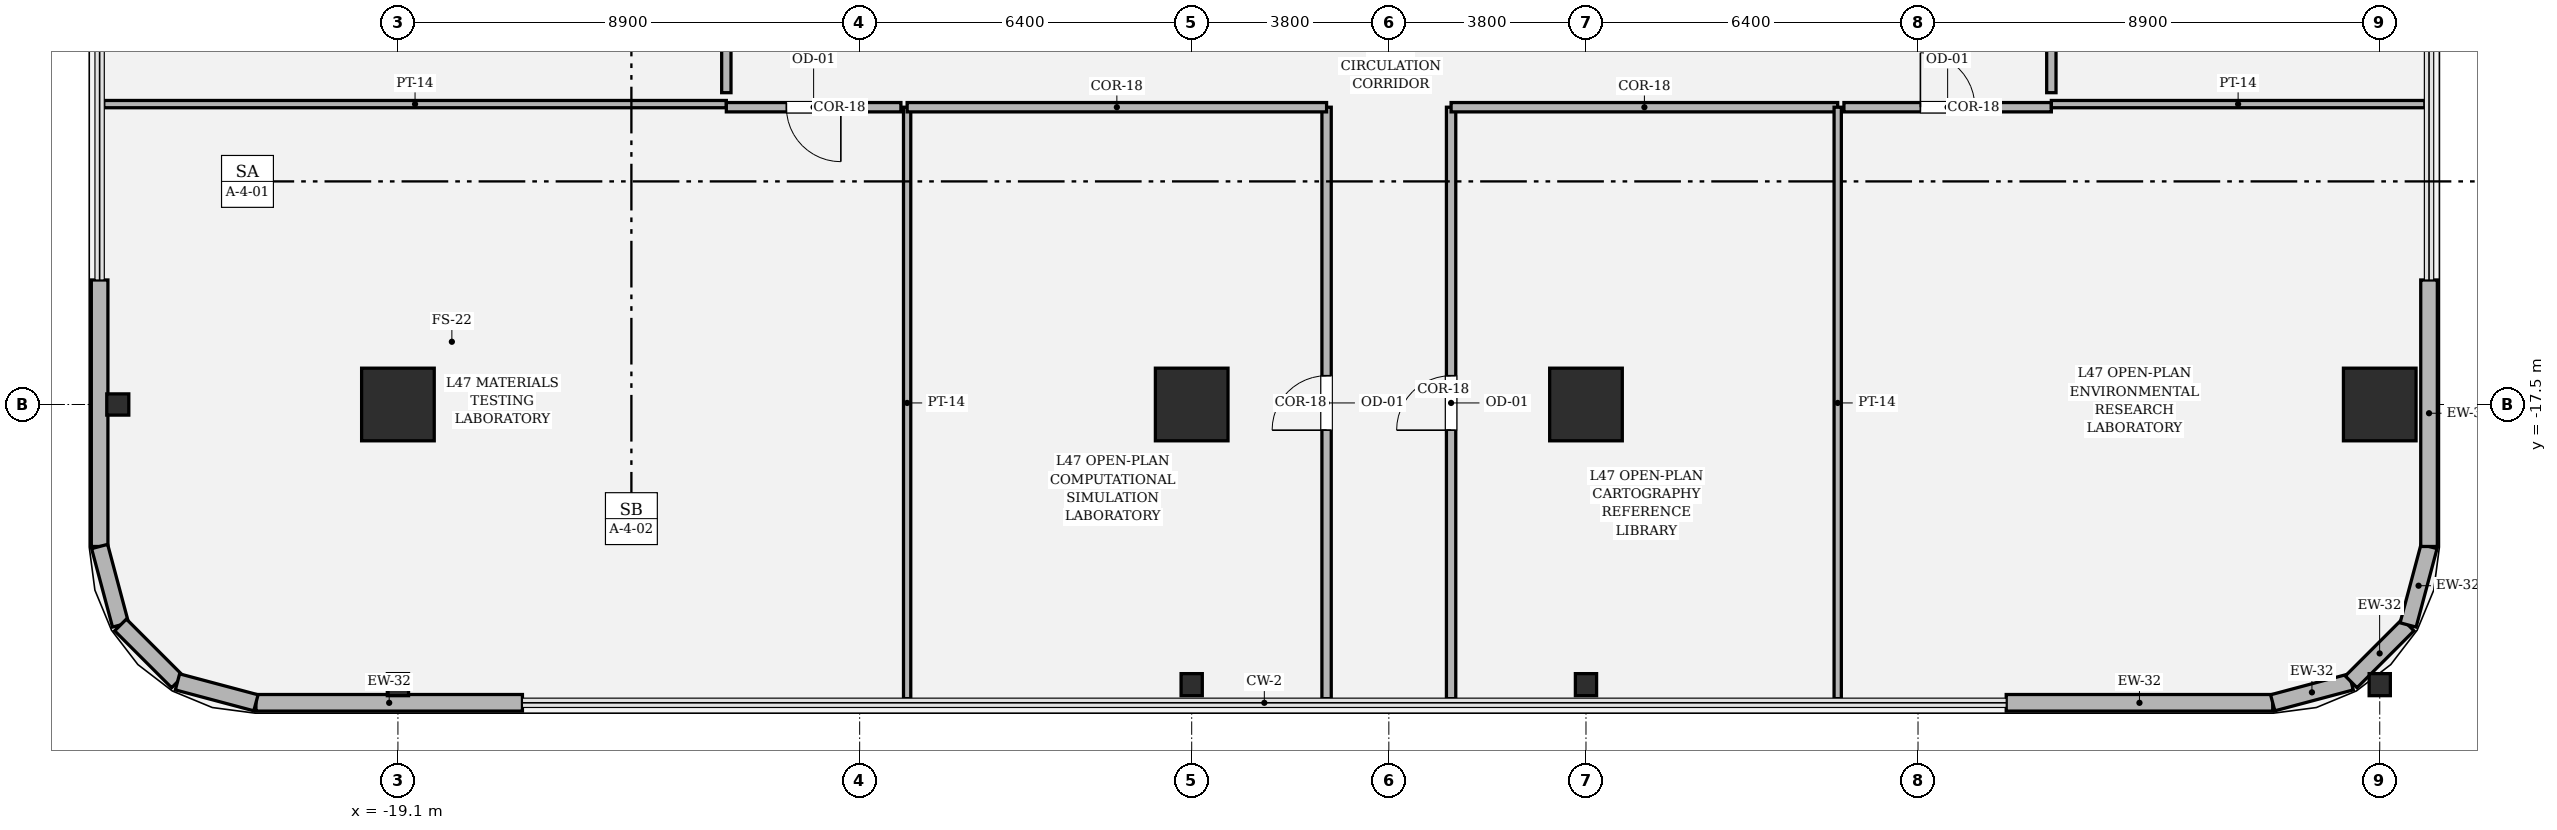
"""IFC4 building model, lengths in metres.
Left out: names, types, materials, properties, quantities, classifications, styles, units other than length and angle.
Written with IfcOpenShell. Run it as: python <this file> out.ifc"""

import sys

from ifc_helpers import new_model, si_unit, direction, frame, frame_2d, origin, origin_2d, place, context, subcontext, project, spatial, rectangle, hollow_rectangle, i_section, extrude, element, fill, save


model = new_model("IFC4")
c1 = context("Model", 3, precision=1e-05, world=origin(), true_north=direction((0.0, 1.0)))
c2 = subcontext(c1, "Body", "Model", "MODEL_VIEW")
j1 = project(units=[si_unit("LENGTHUNIT", "METRE"), si_unit("PLANEANGLEUNIT", "RADIAN")], contexts=[c1])
p1 = place(None, origin())
s1 = spatial("IfcSite", under=j1, at=p1, CompositionType="ELEMENT")
p2 = place(p1, origin())
s2 = spatial("IfcBuilding", under=s1, at=p2, CompositionType="ELEMENT")
p3 = place(p2, frame((0.0, 0.0, 200.55)))
s3 = spatial("IfcBuildingStorey", under=s2, at=p3, CompositionType="ELEMENT", Elevation=200.55)
for number, where, z_axis, x_axis in (
    (1, (-19.1, -17.5, 0.0), (0.0, 0.0, 1.0), (1.0, 0.0, 0.0)),
    (2, (-3.8, -17.5, 0.0), (0.0, 0.0, 1.0), (1.0, 0.0, 0.0)),
    (3, (3.8, -17.5, 0.0), (0.0, 0.0, 1.0), (1.0, 0.0, 0.0)),
    (4, (19.1, -17.5, 0.0), (0.0, 0.0, 1.0), (1.0, 0.0, 0.0)),
):
    element("IfcColumn", number, at=place(p3, frame(where, z_axis=z_axis, x_axis=x_axis)), inside=s3, PredefinedType="COLUMN", context=c2, shape_type="SweptSolid", body=[
        extrude(hollow_rectangle(XDim=1.4, YDim=1.4, WallThickness=0.042, at=origin_2d()), origin(), (0.0, 0.0, 1.0), 4.05),
    ])
for number, where, z_axis, x_axis in (
    (5, (-19.1, -22.9, 0.0), (0.0, 0.0, 1.0), (1.0, 0.0, 0.0)),
    (6, (-3.8, -22.9, 0.0), (0.0, 0.0, 1.0), (1.0, 0.0, 0.0)),
    (7, (3.8, -22.9, 0.0), (0.0, 0.0, 1.0), (1.0, 0.0, 0.0)),
    (8, (19.1, -22.9, 0.0), (0.0, 0.0, 1.0), (1.0, 0.0, 0.0)),
    (9, (-24.5, -17.5, 0.0), (0.0, 0.0, 1.0), (0.0, 1.0, 0.0)),
):
    element("IfcColumn", number, at=place(p3, frame(where, z_axis=z_axis, x_axis=x_axis)), inside=s3, PredefinedType="COLUMN", context=c2, shape_type="SweptSolid", body=[
        extrude(i_section(OverallWidth=0.409, OverallDepth=0.425, WebThickness=0.032, FlangeThickness=0.052, FilletRadius=0.018, at=origin_2d()), origin(), (0.0, 0.0, 1.0), 4.048),
    ])
for number, where, z_axis, x_axis in (
    (10, (-21.837, -23.25, 0.0), (0.0, 0.0, 1.0), (1.0, 0.0, 0.0)),
    (11, (11.9, -23.25, 0.0), (0.0, 0.0, 1.0), (1.0, 0.0, 0.0)),
):
    element("IfcWall", number, at=place(p3, frame(where, z_axis=z_axis, x_axis=x_axis)), inside=s3, PredefinedType="SOLIDWALL", context=c2, shape_type="SweptSolid", body=[
        extrude(rectangle(XDim=5.137, YDim=0.32, at=frame_2d((2.568, 0.0))), origin(), (0.0, 0.0, 1.0), 2.444),
    ])
p4 = place(p3, frame((17.037, -23.25, 0.0), z_axis=(0.0, 0.0, 1.0), x_axis=(0.966224582397, 0.257701486942, 0.0)))
e12 = element("IfcWall", 12, at=p4, inside=s3, PredefinedType="SOLIDWALL", context=c2, shape_type="SweptSolid", body=[
    extrude(rectangle(XDim=1.565, YDim=0.32, at=frame_2d((0.783, 0.0))), origin(), (0.0, 0.0, 1.0), 2.444),
])
p5 = place(p3, frame((18.549, -22.847, 0.0), z_axis=(0.0, 0.0, 1.0), x_axis=(0.707028130747, 0.707185422879, 0.0)))
e13 = element("IfcWall", 13, at=p5, inside=s3, PredefinedType="SOLIDWALL", context=c2, shape_type="SweptSolid", body=[
    extrude(rectangle(XDim=1.552, YDim=0.32, at=frame_2d((0.776, 0.0))), origin(), (0.0, 0.0, 1.0), 2.444),
])
p6 = place(p3, frame((19.646, -21.749, 0.0), z_axis=(0.0, 0.0, 1.0), x_axis=(0.257847112249, 0.966185730957, 0.0)))
e14 = element("IfcWall", 14, at=p6, inside=s3, PredefinedType="SOLIDWALL", context=c2, shape_type="SweptSolid", body=[
    extrude(rectangle(XDim=1.565, YDim=0.32, at=frame_2d((0.783, 0.0))), origin(), (0.0, 0.0, 1.0), 3.77),
])
p7 = place(p3, frame((20.05, -20.237, 0.0), z_axis=(0.0, 0.0, 1.0), x_axis=(0.0, 1.0, 0.0)))
e15 = element("IfcWall", 15, at=p7, inside=s3, PredefinedType="SOLIDWALL", context=c2, shape_type="SweptSolid", body=[
    extrude(rectangle(XDim=5.137, YDim=0.32, at=frame_2d((2.568, 0.0))), origin(), (0.0, 0.0, 1.0), 2.444),
])
p8 = place(p3, frame((-24.85, -15.1, 0.0), z_axis=(0.0, 0.0, 1.0), x_axis=(0.0, -1.0, 0.0)))
e16 = element("IfcWall", 16, at=p8, inside=s3, PredefinedType="SOLIDWALL", context=c2, shape_type="SweptSolid", body=[
    extrude(rectangle(XDim=5.137, YDim=0.32, at=frame_2d((2.568, 0.0))), origin(), (0.0, 0.0, 1.0), 3.77),
])
p9 = place(p3, frame((-24.85, -20.237, 0.0), z_axis=(0.0, 0.0, 1.0), x_axis=(0.257847112249, -0.966185730957, 0.0)))
e17 = element("IfcWall", 17, at=p9, inside=s3, PredefinedType="SOLIDWALL", context=c2, shape_type="SweptSolid", body=[
    extrude(rectangle(XDim=1.565, YDim=0.32, at=frame_2d((0.783, 0.0))), origin(), (0.0, 0.0, 1.0), 3.77),
])
p10 = place(p3, frame((-24.447, -21.749, 0.0), z_axis=(0.0, 0.0, 1.0), x_axis=(0.707028130747, -0.707185422879, 0.0)))
e18 = element("IfcWall", 18, at=p10, inside=s3, PredefinedType="SOLIDWALL", context=c2, shape_type="SweptSolid", body=[
    extrude(rectangle(XDim=1.552, YDim=0.32, at=frame_2d((0.776, 0.0))), origin(), (0.0, 0.0, 1.0), 3.77),
])
p11 = place(p3, frame((-23.349, -22.847, 0.0), z_axis=(0.0, 0.0, 1.0), x_axis=(0.966224582397, -0.257701486942, 0.0)))
e19 = element("IfcWall", 19, at=p11, inside=s3, PredefinedType="SOLIDWALL", context=c2, shape_type="SweptSolid", body=[
    extrude(rectangle(XDim=1.565, YDim=0.32, at=frame_2d((0.783, 0.0))), origin(), (0.0, 0.0, 1.0), 3.77),
])
p12 = place(p3, frame((-1.2, -11.77, 0.0), z_axis=(0.0, 0.0, 1.0), x_axis=(0.0, -1.0, 0.0)))
e20 = element("IfcWall", 20, at=p12, inside=s3, PredefinedType="PARTITIONING", context=c2, shape_type="SweptSolid", body=[
    extrude(rectangle(XDim=11.4, YDim=0.18, at=frame_2d((5.7, 0.0))), origin(), (0.0, 0.0, 1.0), 2.444),
])
p13 = place(p12, frame((5.175, 0.0, 0.0)))
e21 = element("IfcOpeningElement", 21, at=p13, cuts=e20, PredefinedType="OPENING", context=c2, shape_type="SweptSolid", body=[
    extrude(rectangle(XDim=1.05, YDim=2.2, at=frame_2d((0.525, 1.1))), frame((0.0, 0.1, 0.0), z_axis=(0.0, -1.0, 0.0), x_axis=(1.0, 0.0, 0.0)), (0.0, 0.0, 1.0), 0.2),
])
p14 = place(p3, frame((-9.285, -23.17, 0.0), z_axis=(0.0, 0.0, 1.0), x_axis=(0.0, 1.0, 0.0)))
e22 = element("IfcWall", 22, at=p14, inside=s3, PredefinedType="PARTITIONING", context=c2, shape_type="SweptSolid", body=[
    extrude(rectangle(XDim=11.4, YDim=0.14, at=frame_2d((5.7, 0.0))), origin(), (0.0, 0.0, 1.0), 2.444),
])
p15 = place(p3, frame((-9.285, -11.77, 0.0), z_axis=(0.0, 0.0, 1.0), x_axis=(1.0, 0.0, 0.0)))
e23 = element("IfcWall", 23, at=p15, inside=s3, PredefinedType="PARTITIONING", context=c2, shape_type="SweptSolid", body=[
    extrude(rectangle(XDim=8.085, YDim=0.18, at=frame_2d((4.042, 0.0))), origin(), (0.0, 0.0, 1.0), 2.444),
])
p16 = place(p3, frame((1.2, -23.17, 0.0), z_axis=(0.0, 0.0, 1.0), x_axis=(0.0, 1.0, 0.0)))
e24 = element("IfcWall", 24, at=p16, inside=s3, PredefinedType="PARTITIONING", context=c2, shape_type="SweptSolid", body=[
    extrude(rectangle(XDim=11.4, YDim=0.18, at=frame_2d((5.7, 0.0))), origin(), (0.0, 0.0, 1.0), 2.444),
])
p17 = place(p16, frame((5.175, 0.0, 0.0)))
e25 = element("IfcOpeningElement", 25, at=p17, cuts=e24, PredefinedType="OPENING", context=c2, shape_type="SweptSolid", body=[
    extrude(rectangle(XDim=1.05, YDim=2.2, at=frame_2d((0.525, 1.1))), frame((0.0, 0.1, 0.0), z_axis=(0.0, -1.0, 0.0), x_axis=(1.0, 0.0, 0.0)), (0.0, 0.0, 1.0), 0.2),
])
p18 = place(p3, frame((1.2, -11.77, 0.0), z_axis=(0.0, 0.0, 1.0), x_axis=(1.0, 0.0, 0.0)))
e26 = element("IfcWall", 26, at=p18, inside=s3, PredefinedType="PARTITIONING", context=c2, shape_type="SweptSolid", body=[
    extrude(rectangle(XDim=7.452, YDim=0.18, at=frame_2d((3.726, 0.0))), origin(), (0.0, 0.0, 1.0), 2.444),
])
p19 = place(p3, frame((8.652, -11.77, 0.0), z_axis=(0.0, 0.0, 1.0), x_axis=(0.0, -1.0, 0.0)))
e27 = element("IfcWall", 27, at=p19, inside=s3, PredefinedType="PARTITIONING", context=c2, shape_type="SweptSolid", body=[
    extrude(rectangle(XDim=11.4, YDim=0.14, at=frame_2d((5.7, 0.0))), origin(), (0.0, 0.0, 1.0), 2.444),
])
p20 = place(p3, frame((-24.77, -11.71, 0.0), z_axis=(0.0, 0.0, 1.0), x_axis=(1.0, 0.0, 0.0)))
e28 = element("IfcWall", 28, at=p20, inside=s3, PredefinedType="PARTITIONING", context=c2, shape_type="SweptSolid", body=[
    extrude(rectangle(XDim=12.0, YDim=0.14, at=frame_2d((6.0, 0.0))), origin(), (0.0, 0.0, 1.0), 2.444),
])
p21 = place(p3, frame((-12.77, -11.77, 0.0), z_axis=(0.0, 0.0, 1.0), x_axis=(1.0, 0.0, 0.0)))
e29 = element("IfcWall", 29, at=p21, inside=s3, PredefinedType="PARTITIONING", context=c2, shape_type="SweptSolid", body=[
    extrude(rectangle(XDim=3.365, YDim=0.18, at=frame_2d((1.683, 0.0))), origin(), (0.0, 0.0, 1.0), 2.444),
])
p22 = place(p21, frame((1.157, 0.0, 0.0)))
e30 = element("IfcOpeningElement", 30, at=p22, cuts=e29, PredefinedType="OPENING", context=c2, shape_type="SweptSolid", body=[
    extrude(rectangle(XDim=1.05, YDim=2.2, at=frame_2d((0.525, 1.1))), frame((0.0, 0.1, 0.0), z_axis=(0.0, -1.0, 0.0), x_axis=(1.0, 0.0, 0.0)), (0.0, 0.0, 1.0), 0.2),
])
p23 = place(p3, frame((8.772, -11.77, 0.0), z_axis=(0.0, 0.0, 1.0), x_axis=(1.0, 0.0, 0.0)))
e31 = element("IfcWall", 31, at=p23, inside=s3, PredefinedType="PARTITIONING", context=c2, shape_type="SweptSolid", body=[
    extrude(rectangle(XDim=3.998, YDim=0.18, at=frame_2d((1.999, 0.0))), origin(), (0.0, 0.0, 1.0), 2.444),
])
p24 = place(p23, frame((1.474, 0.0, 0.0)))
e32 = element("IfcOpeningElement", 32, at=p24, cuts=e31, PredefinedType="OPENING", context=c2, shape_type="SweptSolid", body=[
    extrude(rectangle(XDim=1.05, YDim=2.2, at=frame_2d((0.525, 1.1))), frame((0.0, 0.1, 0.0), z_axis=(0.0, -1.0, 0.0), x_axis=(1.0, 0.0, 0.0)), (0.0, 0.0, 1.0), 0.2),
])
p25 = place(p3, frame((12.77, -11.71, 0.0), z_axis=(0.0, 0.0, 1.0), x_axis=(1.0, 0.0, 0.0)))
e33 = element("IfcWall", 33, at=p25, inside=s3, PredefinedType="PARTITIONING", context=c2, shape_type="SweptSolid", body=[
    extrude(rectangle(XDim=7.2, YDim=0.14, at=frame_2d((3.6, 0.0))), origin(), (0.0, 0.0, 1.0), 2.444),
])
p26 = place(p3, frame((-12.77, 3.74, 0.0), z_axis=(0.0, 0.0, 1.0), x_axis=(0.0, -1.0, 0.0)))
e34 = element("IfcWall", 34, at=p26, inside=s3, PredefinedType="PARTITIONING", context=c2, shape_type="SweptSolid", body=[
    extrude(rectangle(XDim=15.23, YDim=0.18, at=frame_2d((7.615, 0.0))), origin(), (0.0, 0.0, 1.0), 2.444),
])
p27 = place(p26, frame((6.915, 0.0, 0.0)))
e35 = element("IfcOpeningElement", 35, at=p27, cuts=e34, PredefinedType="OPENING", context=c2, shape_type="SweptSolid", body=[
    extrude(rectangle(XDim=1.4, YDim=2.25, at=frame_2d((0.7, 1.125))), frame((0.0, 0.1, 0.0), z_axis=(0.0, -1.0, 0.0), x_axis=(1.0, 0.0, 0.0)), (0.0, 0.0, 1.0), 0.2),
])
p28 = place(p3, frame((12.77, -11.49, 0.0), z_axis=(0.0, 0.0, 1.0), x_axis=(0.0, 1.0, 0.0)))
e36 = element("IfcWall", 36, at=p28, inside=s3, PredefinedType="PARTITIONING", context=c2, shape_type="SweptSolid", body=[
    extrude(rectangle(XDim=19.528, YDim=0.18, at=frame_2d((9.764, 0.0))), origin(), (0.0, 0.0, 1.0), 2.444),
])
p29 = place(p28, frame((9.239, 0.0, 0.0)))
e37 = element("IfcOpeningElement", 37, at=p29, cuts=e36, PredefinedType="OPENING", context=c2, shape_type="SweptSolid", body=[
    extrude(rectangle(XDim=1.05, YDim=2.2, at=frame_2d((0.525, 1.1))), frame((0.0, 0.1, 0.0), z_axis=(0.0, -1.0, 0.0), x_axis=(1.0, 0.0, 0.0)), (0.0, 0.0, 1.0), 0.2),
])
p30 = place(p13, origin())
e38 = element("IfcDoor", 38, at=p30, inside=s3, OperationType="SINGLE_SWING_RIGHT", PredefinedType="DOOR", context=c2, shape_type="SweptSolid", body=[
    extrude(rectangle(XDim=1.05, YDim=2.2, at=frame_2d((0.525, 1.1))), frame((0.0, 0.025, 0.0), z_axis=(0.0, -1.0, 0.0), x_axis=(1.0, 0.0, 0.0)), (0.0, 0.0, 1.0), 0.05),
])
fill(e21, e38)
p31 = place(p17, origin())
e39 = element("IfcDoor", 39, at=p31, inside=s3, OperationType="SINGLE_SWING_LEFT", PredefinedType="DOOR", context=c2, shape_type="SweptSolid", body=[
    extrude(rectangle(XDim=1.05, YDim=2.2, at=frame_2d((0.525, 1.1))), frame((0.0, 0.025, 0.0), z_axis=(0.0, -1.0, 0.0), x_axis=(1.0, 0.0, 0.0)), (0.0, 0.0, 1.0), 0.05),
])
fill(e25, e39)
p32 = place(p22, origin())
e40 = element("IfcDoor", 40, at=p32, inside=s3, OperationType="SINGLE_SWING_RIGHT", PredefinedType="DOOR", context=c2, shape_type="SweptSolid", body=[
    extrude(rectangle(XDim=1.05, YDim=2.2, at=frame_2d((0.525, 1.1))), frame((0.0, 0.025, 0.0), z_axis=(0.0, -1.0, 0.0), x_axis=(1.0, 0.0, 0.0)), (0.0, 0.0, 1.0), 0.05),
])
fill(e30, e40)
p33 = place(p24, origin())
e41 = element("IfcDoor", 41, at=p33, inside=s3, OperationType="SINGLE_SWING_LEFT", PredefinedType="DOOR", context=c2, shape_type="SweptSolid", body=[
    extrude(rectangle(XDim=1.05, YDim=2.2, at=frame_2d((0.525, 1.1))), frame((0.0, 0.025, 0.0), z_axis=(0.0, -1.0, 0.0), x_axis=(1.0, 0.0, 0.0)), (0.0, 0.0, 1.0), 0.05),
])
fill(e32, e41)
save(model, sys.argv[1])
